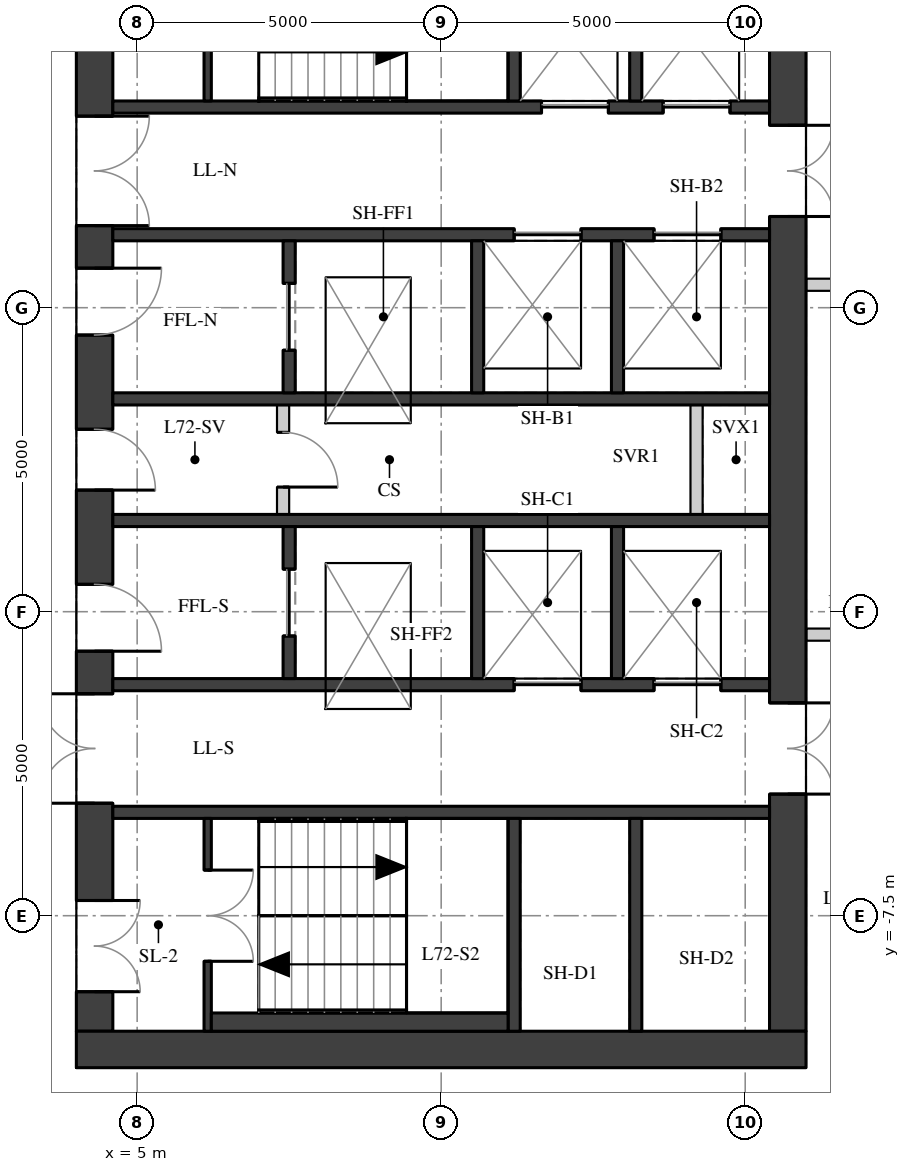
"""IFC4 building model, lengths in metres.
Left out: names, types, materials, properties, quantities, classifications, styles, units other than length and angle.
Written with IfcOpenShell. Run it as: python <this file> out.ifc"""

import sys

from ifc_helpers import new_model, si_unit, direction, frame, frame_2d, origin, place, context, subcontext, project, spatial, rectangle, extrude, element, fill, save


model = new_model("IFC4")
c1 = context("Model", 3, precision=1e-05, world=origin(), true_north=direction((0.0, 1.0)))
c2 = subcontext(c1, "Body", "Model", "MODEL_VIEW")
j1 = project(units=[si_unit("LENGTHUNIT", "METRE"), si_unit("PLANEANGLEUNIT", "RADIAN")], contexts=[c1])
p1 = place(None, origin())
s1 = spatial("IfcSite", under=j1, at=p1, CompositionType="ELEMENT")
p2 = place(p1, origin())
s2 = spatial("IfcBuilding", under=s1, at=p2, CompositionType="ELEMENT")
p3 = place(p2, frame((0.0, 0.0, 253.1)))
s3 = spatial("IfcBuildingStorey", under=s2, at=p3, CompositionType="ELEMENT", Elevation=253.1)
p4 = place(p3, frame((4.3, -9.4, 0.0), z_axis=(0.0, 0.0, 1.0), x_axis=(0.0, 1.0, 0.0)))
e1 = element("IfcWall", 1, at=p4, inside=s3, PredefinedType="SHEAR", context=c2, shape_type="SweptSolid", body=[
    extrude(rectangle(XDim=18.8, YDim=0.6, at=frame_2d((9.4, 0.0))), origin(), (0.0, 0.0, 1.0), 3.02),
])
p5 = place(p4, frame((0.65, 0.0, 0.0)))
e2 = element("IfcOpeningElement", 2, at=p5, cuts=e1, PredefinedType="OPENING", context=c2, shape_type="SweptSolid", body=[
    extrude(rectangle(XDim=1.5, YDim=2.1, at=frame_2d((0.75, 1.05))), frame((0.0, 0.31, 0.0), z_axis=(0.0, -1.0, 0.0), x_axis=(1.0, 0.0, 0.0)), (0.0, 0.0, 1.0), 0.62),
])
p6 = place(p4, frame((3.75, 0.0, 0.0)))
e3 = element("IfcOpeningElement", 3, at=p6, cuts=e1, PredefinedType="OPENING", context=c2, shape_type="SweptSolid", body=[
    extrude(rectangle(XDim=1.8, YDim=2.1, at=frame_2d((0.9, 1.05))), frame((0.0, 0.31, 0.0), z_axis=(0.0, -1.0, 0.0), x_axis=(1.0, 0.0, 0.0)), (0.0, 0.0, 1.0), 0.62),
])
p7 = place(p4, frame((6.25, 0.0, 0.0)))
e4 = element("IfcOpeningElement", 4, at=p7, cuts=e1, PredefinedType="OPENING", context=c2, shape_type="SweptSolid", body=[
    extrude(rectangle(XDim=1.1, YDim=2.1, at=frame_2d((0.55, 1.05))), frame((0.0, 0.31, 0.0), z_axis=(0.0, -1.0, 0.0), x_axis=(1.0, 0.0, 0.0)), (0.0, 0.0, 1.0), 0.62),
])
p8 = place(p4, frame((8.9, 0.0, 0.0)))
e5 = element("IfcOpeningElement", 5, at=p8, cuts=e1, PredefinedType="OPENING", context=c2, shape_type="SweptSolid", body=[
    extrude(rectangle(XDim=1.0, YDim=2.1, at=frame_2d((0.5, 1.05))), frame((0.0, 0.31, 0.0), z_axis=(0.0, -1.0, 0.0), x_axis=(1.0, 0.0, 0.0)), (0.0, 0.0, 1.0), 0.62),
])
p9 = place(p4, frame((11.45, 0.0, 0.0)))
e6 = element("IfcOpeningElement", 6, at=p9, cuts=e1, PredefinedType="OPENING", context=c2, shape_type="SweptSolid", body=[
    extrude(rectangle(XDim=1.1, YDim=2.1, at=frame_2d((0.55, 1.05))), frame((0.0, 0.31, 0.0), z_axis=(0.0, -1.0, 0.0), x_axis=(1.0, 0.0, 0.0)), (0.0, 0.0, 1.0), 0.62),
])
p10 = place(p4, frame((13.25, 0.0, 0.0)))
e7 = element("IfcOpeningElement", 7, at=p10, cuts=e1, PredefinedType="OPENING", context=c2, shape_type="SweptSolid", body=[
    extrude(rectangle(XDim=1.8, YDim=2.1, at=frame_2d((0.9, 1.05))), frame((0.0, 0.31, 0.0), z_axis=(0.0, -1.0, 0.0), x_axis=(1.0, 0.0, 0.0)), (0.0, 0.0, 1.0), 0.62),
])
p11 = place(p4, frame((16.65, 0.0, 0.0)))
e8 = element("IfcOpeningElement", 8, at=p11, cuts=e1, PredefinedType="OPENING", context=c2, shape_type="SweptSolid", body=[
    extrude(rectangle(XDim=1.5, YDim=2.1, at=frame_2d((0.75, 1.05))), frame((0.0, 0.31, 0.0), z_axis=(0.0, -1.0, 0.0), x_axis=(1.0, 0.0, 0.0)), (0.0, 0.0, 1.0), 0.62),
])
p12 = place(p3, frame((15.7, -9.4, 0.0), z_axis=(0.0, 0.0, 1.0), x_axis=(0.0, 1.0, 0.0)))
e9 = element("IfcWall", 9, at=p12, inside=s3, PredefinedType="SHEAR", context=c2, shape_type="SweptSolid", body=[
    extrude(rectangle(XDim=18.8, YDim=0.6, at=frame_2d((9.4, 0.0))), origin(), (0.0, 0.0, 1.0), 3.02),
])
p13 = place(p12, frame((13.4, 0.0, 0.0)))
e10 = element("IfcOpeningElement", 10, at=p13, cuts=e9, PredefinedType="OPENING", context=c2, shape_type="SweptSolid", body=[
    extrude(rectangle(XDim=1.5, YDim=2.1, at=frame_2d((0.75, 1.05))), frame((0.0, 0.31, 0.0), z_axis=(0.0, -1.0, 0.0), x_axis=(1.0, 0.0, 0.0)), (0.0, 0.0, 1.0), 0.62),
])
p14 = place(p12, frame((3.9, 0.0, 0.0)))
e11 = element("IfcOpeningElement", 11, at=p14, cuts=e9, PredefinedType="OPENING", context=c2, shape_type="SweptSolid", body=[
    extrude(rectangle(XDim=1.5, YDim=2.1, at=frame_2d((0.75, 1.05))), frame((0.0, 0.31, 0.0), z_axis=(0.0, -1.0, 0.0), x_axis=(1.0, 0.0, 0.0)), (0.0, 0.0, 1.0), 0.62),
])
p15 = place(p3, frame((4.0, -9.7, 0.0), z_axis=(0.0, 0.0, 1.0), x_axis=(1.0, 0.0, 0.0)))
e12 = element("IfcWall", 12, at=p15, inside=s3, PredefinedType="SHEAR", context=c2, shape_type="SweptSolid", body=[
    extrude(rectangle(XDim=12.0, YDim=0.6, at=frame_2d((6.0, 0.0))), origin(), (0.0, 0.0, 1.0), 3.02),
])
p16 = place(p3, frame((4.6, 5.8, 0.0), z_axis=(0.0, 0.0, 1.0), x_axis=(1.0, 0.0, 0.0)))
e13 = element("IfcWall", 13, at=p16, inside=s3, PredefinedType="SHEAR", context=c2, shape_type="SweptSolid", body=[
    extrude(rectangle(XDim=10.8, YDim=0.2, at=frame_2d((5.4, 0.0))), origin(), (0.0, 0.0, 1.0), 3.02),
])
p17 = place(p16, frame((7.05, 0.0, 0.0)))
e14 = element("IfcOpeningElement", 14, at=p17, cuts=e13, PredefinedType="OPENING", context=c2, shape_type="SweptSolid", body=[
    extrude(rectangle(XDim=1.1, YDim=2.1, at=frame_2d((0.55, 1.05))), frame((0.0, 0.11, 0.0), z_axis=(0.0, -1.0, 0.0), x_axis=(1.0, 0.0, 0.0)), (0.0, 0.0, 1.0), 0.22),
])
p18 = place(p16, frame((9.05, 0.0, 0.0)))
e15 = element("IfcOpeningElement", 15, at=p18, cuts=e13, PredefinedType="OPENING", context=c2, shape_type="SweptSolid", body=[
    extrude(rectangle(XDim=1.1, YDim=2.1, at=frame_2d((0.55, 1.05))), frame((0.0, 0.11, 0.0), z_axis=(0.0, -1.0, 0.0), x_axis=(1.0, 0.0, 0.0)), (0.0, 0.0, 1.0), 0.22),
])
p19 = place(p3, frame((4.6, 3.7, 0.0), z_axis=(0.0, 0.0, 1.0), x_axis=(1.0, 0.0, 0.0)))
e16 = element("IfcWall", 16, at=p19, inside=s3, PredefinedType="SHEAR", context=c2, shape_type="SweptSolid", body=[
    extrude(rectangle(XDim=10.8, YDim=0.2, at=frame_2d((5.4, 0.0))), origin(), (0.0, 0.0, 1.0), 3.02),
])
p20 = place(p19, frame((6.6, 0.0, 0.0)))
e17 = element("IfcOpeningElement", 17, at=p20, cuts=e16, PredefinedType="OPENING", context=c2, shape_type="SweptSolid", body=[
    extrude(rectangle(XDim=1.1, YDim=2.1, at=frame_2d((0.55, 1.05))), frame((0.0, 0.11, 0.0), z_axis=(0.0, -1.0, 0.0), x_axis=(1.0, 0.0, 0.0)), (0.0, 0.0, 1.0), 0.22),
])
p21 = place(p19, frame((8.9, 0.0, 0.0)))
e18 = element("IfcOpeningElement", 18, at=p21, cuts=e16, PredefinedType="OPENING", context=c2, shape_type="SweptSolid", body=[
    extrude(rectangle(XDim=1.1, YDim=2.1, at=frame_2d((0.55, 1.05))), frame((0.0, 0.11, 0.0), z_axis=(0.0, -1.0, 0.0), x_axis=(1.0, 0.0, 0.0)), (0.0, 0.0, 1.0), 0.22),
])
for number, where, z_axis, x_axis in (
    (19, (4.6, 1.0, 0.0), (0.0, 0.0, 1.0), (1.0, 0.0, 0.0)),
    (20, (4.6, -1.0, 0.0), (0.0, 0.0, 1.0), (1.0, 0.0, 0.0)),
):
    element("IfcWall", number, at=place(p3, frame(where, z_axis=z_axis, x_axis=x_axis)), inside=s3, PredefinedType="SHEAR", context=c2, shape_type="SweptSolid", body=[
        extrude(rectangle(XDim=10.8, YDim=0.2, at=frame_2d((5.4, 0.0))), origin(), (0.0, 0.0, 1.0), 3.02),
    ])
p22 = place(p3, frame((4.6, -3.7, 0.0), z_axis=(0.0, 0.0, 1.0), x_axis=(1.0, 0.0, 0.0)))
e21 = element("IfcWall", 21, at=p22, inside=s3, PredefinedType="SHEAR", context=c2, shape_type="SweptSolid", body=[
    extrude(rectangle(XDim=10.8, YDim=0.2, at=frame_2d((5.4, 0.0))), origin(), (0.0, 0.0, 1.0), 3.02),
])
p23 = place(p22, frame((6.6, 0.0, 0.0)))
e22 = element("IfcOpeningElement", 22, at=p23, cuts=e21, PredefinedType="OPENING", context=c2, shape_type="SweptSolid", body=[
    extrude(rectangle(XDim=1.1, YDim=2.1, at=frame_2d((0.55, 1.05))), frame((0.0, 0.11, 0.0), z_axis=(0.0, -1.0, 0.0), x_axis=(1.0, 0.0, 0.0)), (0.0, 0.0, 1.0), 0.22),
])
p24 = place(p22, frame((8.9, 0.0, 0.0)))
e23 = element("IfcOpeningElement", 23, at=p24, cuts=e21, PredefinedType="OPENING", context=c2, shape_type="SweptSolid", body=[
    extrude(rectangle(XDim=1.1, YDim=2.1, at=frame_2d((0.55, 1.05))), frame((0.0, 0.11, 0.0), z_axis=(0.0, -1.0, 0.0), x_axis=(1.0, 0.0, 0.0)), (0.0, 0.0, 1.0), 0.22),
])
p25 = place(p3, frame((4.6, -5.8, 0.0), z_axis=(0.0, 0.0, 1.0), x_axis=(1.0, 0.0, 0.0)))
e24 = element("IfcWall", 24, at=p25, inside=s3, PredefinedType="SHEAR", context=c2, shape_type="SweptSolid", body=[
    extrude(rectangle(XDim=10.8, YDim=0.2, at=frame_2d((5.4, 0.0))), origin(), (0.0, 0.0, 1.0), 3.02),
])
for number, where, z_axis, x_axis in (
    (25, (11.2, 5.9, 0.0), (0.0, 0.0, 1.0), (0.0, 1.0, 0.0)),
    (26, (11.2, -9.4, 0.0), (0.0, 0.0, 1.0), (0.0, 1.0, 0.0)),
    (27, (13.2, 5.9, 0.0), (0.0, 0.0, 1.0), (0.0, 1.0, 0.0)),
    (28, (13.2, -9.4, 0.0), (0.0, 0.0, 1.0), (0.0, 1.0, 0.0)),
):
    element("IfcWall", number, at=place(p3, frame(where, z_axis=z_axis, x_axis=x_axis)), inside=s3, PredefinedType="SHEAR", context=c2, shape_type="SweptSolid", body=[
        extrude(rectangle(XDim=3.5, YDim=0.2, at=frame_2d((1.75, 0.0))), origin(), (0.0, 0.0, 1.0), 3.02),
    ])
p26 = place(p3, frame((7.5, 1.1, 0.0), z_axis=(0.0, 0.0, 1.0), x_axis=(0.0, 1.0, 0.0)))
e29 = element("IfcWall", 29, at=p26, inside=s3, PredefinedType="SHEAR", context=c2, shape_type="SweptSolid", body=[
    extrude(rectangle(XDim=2.5, YDim=0.2, at=frame_2d((1.25, 0.0))), origin(), (0.0, 0.0, 1.0), 3.02),
])
p27 = place(p26, frame((0.7, 0.0, 0.0)))
e30 = element("IfcOpeningElement", 30, at=p27, cuts=e29, PredefinedType="OPENING", context=c2, shape_type="SweptSolid", body=[
    extrude(rectangle(XDim=1.1, YDim=2.1, at=frame_2d((0.55, 1.05))), frame((0.0, 0.11, 0.0), z_axis=(0.0, -1.0, 0.0), x_axis=(1.0, 0.0, 0.0)), (0.0, 0.0, 1.0), 0.22),
])
p28 = place(p3, frame((7.5, -3.6, 0.0), z_axis=(0.0, 0.0, 1.0), x_axis=(0.0, 1.0, 0.0)))
e31 = element("IfcWall", 31, at=p28, inside=s3, PredefinedType="SHEAR", context=c2, shape_type="SweptSolid", body=[
    extrude(rectangle(XDim=2.5, YDim=0.2, at=frame_2d((1.25, 0.0))), origin(), (0.0, 0.0, 1.0), 3.02),
])
p29 = place(p28, frame((0.7, 0.0, 0.0)))
e32 = element("IfcOpeningElement", 32, at=p29, cuts=e31, PredefinedType="OPENING", context=c2, shape_type="SweptSolid", body=[
    extrude(rectangle(XDim=1.1, YDim=2.1, at=frame_2d((0.55, 1.05))), frame((0.0, 0.11, 0.0), z_axis=(0.0, -1.0, 0.0), x_axis=(1.0, 0.0, 0.0)), (0.0, 0.0, 1.0), 0.22),
])
for number, where, z_axis, x_axis in (
    (33, (10.6, 1.1, 0.0), (0.0, 0.0, 1.0), (0.0, 1.0, 0.0)),
    (34, (10.6, -3.6, 0.0), (0.0, 0.0, 1.0), (0.0, 1.0, 0.0)),
    (35, (12.9, 1.1, 0.0), (0.0, 0.0, 1.0), (0.0, 1.0, 0.0)),
    (36, (12.9, -3.6, 0.0), (0.0, 0.0, 1.0), (0.0, 1.0, 0.0)),
):
    element("IfcWall", number, at=place(p3, frame(where, z_axis=z_axis, x_axis=x_axis)), inside=s3, PredefinedType="SHEAR", context=c2, shape_type="SweptSolid", body=[
        extrude(rectangle(XDim=2.5, YDim=0.2, at=frame_2d((1.25, 0.0))), origin(), (0.0, 0.0, 1.0), 3.02),
    ])
p30 = place(p3, frame((6.16, 5.9, 0.0), z_axis=(0.0, 0.0, 1.0), x_axis=(0.0, 1.0, 0.0)))
e37 = element("IfcWall", 37, at=p30, inside=s3, PredefinedType="SHEAR", context=c2, shape_type="SweptSolid", body=[
    extrude(rectangle(XDim=3.5, YDim=0.12, at=frame_2d((1.75, 0.0))), origin(), (0.0, 0.0, 1.0), 3.02),
])
p31 = place(p30, frame((0.85, 0.0, 0.0)))
e38 = element("IfcOpeningElement", 38, at=p31, cuts=e37, PredefinedType="OPENING", context=c2, shape_type="SweptSolid", body=[
    extrude(rectangle(XDim=1.5, YDim=2.1, at=frame_2d((0.75, 1.05))), frame((0.0, 0.07, 0.0), z_axis=(0.0, -1.0, 0.0), x_axis=(1.0, 0.0, 0.0)), (0.0, 0.0, 1.0), 0.14),
])
p32 = place(p3, frame((6.16, -9.4, 0.0), z_axis=(0.0, 0.0, 1.0), x_axis=(0.0, 1.0, 0.0)))
e39 = element("IfcWall", 39, at=p32, inside=s3, PredefinedType="SHEAR", context=c2, shape_type="SweptSolid", body=[
    extrude(rectangle(XDim=3.5, YDim=0.12, at=frame_2d((1.75, 0.0))), origin(), (0.0, 0.0, 1.0), 3.02),
])
p33 = place(p32, frame((1.15, 0.0, 0.0)))
e40 = element("IfcOpeningElement", 40, at=p33, cuts=e39, PredefinedType="OPENING", context=c2, shape_type="SweptSolid", body=[
    extrude(rectangle(XDim=1.5, YDim=2.1, at=frame_2d((0.75, 1.05))), frame((0.0, 0.07, 0.0), z_axis=(0.0, -1.0, 0.0), x_axis=(1.0, 0.0, 0.0)), (0.0, 0.0, 1.0), 0.14),
])
p34 = place(p3, frame((7.4, -0.9, 0.0), z_axis=(0.0, 0.0, 1.0), x_axis=(0.0, 1.0, 0.0)))
e41 = element("IfcWall", 41, at=p34, inside=s3, PredefinedType="PARTITIONING", context=c2, shape_type="SweptSolid", body=[
    extrude(rectangle(XDim=1.8, YDim=0.2, at=frame_2d((0.9, 0.0))), origin(), (0.0, 0.0, 1.0), 3.02),
])
p35 = place(p34, frame((0.45, 0.0, 0.0)))
e42 = element("IfcOpeningElement", 42, at=p35, cuts=e41, PredefinedType="OPENING", context=c2, shape_type="SweptSolid", body=[
    extrude(rectangle(XDim=0.9, YDim=2.1, at=frame_2d((0.45, 1.05))), frame((0.0, 0.11, 0.0), z_axis=(0.0, -1.0, 0.0), x_axis=(1.0, 0.0, 0.0)), (0.0, 0.0, 1.0), 0.22),
])
p36 = place(p3, frame((14.2, -0.9, 0.0), z_axis=(0.0, 0.0, 1.0), x_axis=(0.0, 1.0, 0.0)))
e43 = element("IfcWall", 43, at=p36, inside=s3, PredefinedType="PARTITIONING", context=c2, shape_type="SweptSolid", body=[
    extrude(rectangle(XDim=1.8, YDim=0.2, at=frame_2d((0.9, 0.0))), origin(), (0.0, 0.0, 1.0), 3.02),
])
p37 = place(p3, frame((6.22, -9.25, 0.0), z_axis=(0.0, 0.0, 1.0), x_axis=(1.0, 0.0, 0.0)))
e44 = element("IfcWall", 44, at=p37, inside=s3, PredefinedType="PARTITIONING", context=c2, shape_type="SweptSolid", body=[
    extrude(rectangle(XDim=4.88, YDim=0.3, at=frame_2d((2.44, 0.0))), origin(), (0.0, 0.0, 1.0), 3.02),
])
p38 = place(p3, frame((17.5, 2.877, 0.0), z_axis=(0.0, 0.0, 1.0), x_axis=(-1.0, 0.0, 0.0)))
e45 = element("IfcWall", 45, at=p38, inside=s3, PredefinedType="PARTITIONING", context=c2, shape_type="SweptSolid", body=[
    extrude(rectangle(XDim=1.496, YDim=0.2, at=frame_2d((0.748, 0.0))), origin(), (0.0, 0.0, 1.0), 3.02),
])
p39 = place(p3, frame((16.004, -2.877, 0.0), z_axis=(0.0, 0.0, 1.0), x_axis=(1.0, 0.0, 0.0)))
e46 = element("IfcWall", 46, at=p39, inside=s3, PredefinedType="PARTITIONING", context=c2, shape_type="SweptSolid", body=[
    extrude(rectangle(XDim=1.596, YDim=0.2, at=frame_2d((0.798, 0.0))), origin(), (0.0, 0.0, 1.0), 2.57),
])
p40 = place(p5, origin())
e47 = element("IfcDoor", 47, at=p40, inside=s3, OperationType="DOUBLE_DOOR_SINGLE_SWING", PredefinedType="DOOR", context=c2, shape_type="SweptSolid", body=[
    extrude(rectangle(XDim=1.5, YDim=2.1, at=frame_2d((0.75, 1.05))), frame((0.0, 0.025, 0.0), z_axis=(0.0, -1.0, 0.0), x_axis=(1.0, 0.0, 0.0)), (0.0, 0.0, 1.0), 0.05),
])
fill(e2, e47)
p41 = place(p6, origin())
e48 = element("IfcDoor", 48, at=p41, inside=s3, OperationType="DOUBLE_DOOR_SINGLE_SWING", PredefinedType="DOOR", context=c2, shape_type="SweptSolid", body=[
    extrude(rectangle(XDim=1.8, YDim=2.1, at=frame_2d((0.9, 1.05))), frame((0.0, 0.025, 0.0), z_axis=(0.0, -1.0, 0.0), x_axis=(1.0, 0.0, 0.0)), (0.0, 0.0, 1.0), 0.05),
])
fill(e3, e48)
p42 = place(p7, origin())
e49 = element("IfcDoor", 49, at=p42, inside=s3, OperationType="SINGLE_SWING_RIGHT", PredefinedType="DOOR", context=c2, shape_type="SweptSolid", body=[
    extrude(rectangle(XDim=1.1, YDim=2.1, at=frame_2d((0.55, 1.05))), frame((0.0, 0.025, 0.0), z_axis=(0.0, -1.0, 0.0), x_axis=(1.0, 0.0, 0.0)), (0.0, 0.0, 1.0), 0.05),
])
fill(e4, e49)
p43 = place(p8, origin())
e50 = element("IfcDoor", 50, at=p43, inside=s3, OperationType="SINGLE_SWING_RIGHT", PredefinedType="DOOR", context=c2, shape_type="SweptSolid", body=[
    extrude(rectangle(XDim=1.0, YDim=2.1, at=frame_2d((0.5, 1.05))), frame((0.0, 0.025, 0.0), z_axis=(0.0, -1.0, 0.0), x_axis=(1.0, 0.0, 0.0)), (0.0, 0.0, 1.0), 0.05),
])
fill(e5, e50)
p44 = place(p9, origin())
e51 = element("IfcDoor", 51, at=p44, inside=s3, OperationType="SINGLE_SWING_LEFT", PredefinedType="DOOR", context=c2, shape_type="SweptSolid", body=[
    extrude(rectangle(XDim=1.1, YDim=2.1, at=frame_2d((0.55, 1.05))), frame((0.0, 0.025, 0.0), z_axis=(0.0, -1.0, 0.0), x_axis=(1.0, 0.0, 0.0)), (0.0, 0.0, 1.0), 0.05),
])
fill(e6, e51)
p45 = place(p10, origin())
e52 = element("IfcDoor", 52, at=p45, inside=s3, OperationType="DOUBLE_DOOR_SINGLE_SWING", PredefinedType="DOOR", context=c2, shape_type="SweptSolid", body=[
    extrude(rectangle(XDim=1.8, YDim=2.1, at=frame_2d((0.9, 1.05))), frame((0.0, 0.025, 0.0), z_axis=(0.0, -1.0, 0.0), x_axis=(1.0, 0.0, 0.0)), (0.0, 0.0, 1.0), 0.05),
])
fill(e7, e52)
p46 = place(p13, origin())
e53 = element("IfcDoor", 53, at=p46, inside=s3, OperationType="DOUBLE_DOOR_SINGLE_SWING", PredefinedType="DOOR", context=c2, shape_type="SweptSolid", body=[
    extrude(rectangle(XDim=1.5, YDim=2.1, at=frame_2d((0.75, 1.05))), frame((0.0, 0.025, 0.0), z_axis=(0.0, -1.0, 0.0), x_axis=(1.0, 0.0, 0.0)), (0.0, 0.0, 1.0), 0.05),
])
fill(e10, e53)
p47 = place(p14, origin())
e54 = element("IfcDoor", 54, at=p47, inside=s3, OperationType="DOUBLE_DOOR_SINGLE_SWING", PredefinedType="DOOR", context=c2, shape_type="SweptSolid", body=[
    extrude(rectangle(XDim=1.5, YDim=2.1, at=frame_2d((0.75, 1.05))), frame((0.0, 0.025, 0.0), z_axis=(0.0, -1.0, 0.0), x_axis=(1.0, 0.0, 0.0)), (0.0, 0.0, 1.0), 0.05),
])
fill(e11, e54)
p48 = place(p33, origin())
e55 = element("IfcDoor", 55, at=p48, inside=s3, OperationType="DOUBLE_DOOR_SINGLE_SWING", PredefinedType="DOOR", context=c2, shape_type="SweptSolid", body=[
    extrude(rectangle(XDim=1.5, YDim=2.1, at=frame_2d((0.75, 1.05))), frame((0.0, 0.025, 0.0), z_axis=(0.0, -1.0, 0.0), x_axis=(1.0, 0.0, 0.0)), (0.0, 0.0, 1.0), 0.05),
])
fill(e40, e55)
p49 = place(p17, origin())
e56 = element("IfcDoor", 56, at=p49, inside=s3, OperationType="DOUBLE_DOOR_SLIDING", PredefinedType="DOOR", context=c2, shape_type="SweptSolid", body=[
    extrude(rectangle(XDim=1.1, YDim=2.1, at=frame_2d((0.55, 1.05))), frame((0.0, 0.025, 0.0), z_axis=(0.0, -1.0, 0.0), x_axis=(1.0, 0.0, 0.0)), (0.0, 0.0, 1.0), 0.05),
])
fill(e14, e56)
p50 = place(p18, origin())
e57 = element("IfcDoor", 57, at=p50, inside=s3, OperationType="DOUBLE_DOOR_SLIDING", PredefinedType="DOOR", context=c2, shape_type="SweptSolid", body=[
    extrude(rectangle(XDim=1.1, YDim=2.1, at=frame_2d((0.55, 1.05))), frame((0.0, 0.025, 0.0), z_axis=(0.0, -1.0, 0.0), x_axis=(1.0, 0.0, 0.0)), (0.0, 0.0, 1.0), 0.05),
])
fill(e15, e57)
p51 = place(p20, origin())
e58 = element("IfcDoor", 58, at=p51, inside=s3, OperationType="DOUBLE_DOOR_SLIDING", PredefinedType="DOOR", context=c2, shape_type="SweptSolid", body=[
    extrude(rectangle(XDim=1.1, YDim=2.1, at=frame_2d((0.55, 1.05))), frame((0.0, 0.025, 0.0), z_axis=(0.0, -1.0, 0.0), x_axis=(1.0, 0.0, 0.0)), (0.0, 0.0, 1.0), 0.05),
])
fill(e17, e58)
p52 = place(p21, origin())
e59 = element("IfcDoor", 59, at=p52, inside=s3, OperationType="DOUBLE_DOOR_SLIDING", PredefinedType="DOOR", context=c2, shape_type="SweptSolid", body=[
    extrude(rectangle(XDim=1.1, YDim=2.1, at=frame_2d((0.55, 1.05))), frame((0.0, 0.025, 0.0), z_axis=(0.0, -1.0, 0.0), x_axis=(1.0, 0.0, 0.0)), (0.0, 0.0, 1.0), 0.05),
])
fill(e18, e59)
p53 = place(p23, origin())
e60 = element("IfcDoor", 60, at=p53, inside=s3, OperationType="DOUBLE_DOOR_SLIDING", PredefinedType="DOOR", context=c2, shape_type="SweptSolid", body=[
    extrude(rectangle(XDim=1.1, YDim=2.1, at=frame_2d((0.55, 1.05))), frame((0.0, 0.025, 0.0), z_axis=(0.0, -1.0, 0.0), x_axis=(1.0, 0.0, 0.0)), (0.0, 0.0, 1.0), 0.05),
])
fill(e22, e60)
p54 = place(p24, origin())
e61 = element("IfcDoor", 61, at=p54, inside=s3, OperationType="DOUBLE_DOOR_SLIDING", PredefinedType="DOOR", context=c2, shape_type="SweptSolid", body=[
    extrude(rectangle(XDim=1.1, YDim=2.1, at=frame_2d((0.55, 1.05))), frame((0.0, 0.025, 0.0), z_axis=(0.0, -1.0, 0.0), x_axis=(1.0, 0.0, 0.0)), (0.0, 0.0, 1.0), 0.05),
])
fill(e23, e61)
p55 = place(p27, origin())
e62 = element("IfcDoor", 62, at=p55, inside=s3, OperationType="DOUBLE_DOOR_SLIDING", PredefinedType="DOOR", context=c2, shape_type="SweptSolid", body=[
    extrude(rectangle(XDim=1.1, YDim=2.1, at=frame_2d((0.55, 1.05))), frame((0.0, 0.025, 0.0), z_axis=(0.0, -1.0, 0.0), x_axis=(1.0, 0.0, 0.0)), (0.0, 0.0, 1.0), 0.05),
])
fill(e30, e62)
p56 = place(p29, origin())
e63 = element("IfcDoor", 63, at=p56, inside=s3, OperationType="DOUBLE_DOOR_SLIDING", PredefinedType="DOOR", context=c2, shape_type="SweptSolid", body=[
    extrude(rectangle(XDim=1.1, YDim=2.1, at=frame_2d((0.55, 1.05))), frame((0.0, 0.025, 0.0), z_axis=(0.0, -1.0, 0.0), x_axis=(1.0, 0.0, 0.0)), (0.0, 0.0, 1.0), 0.05),
])
fill(e32, e63)
p57 = place(p35, origin())
e64 = element("IfcDoor", 64, at=p57, inside=s3, OperationType="SINGLE_SWING_RIGHT", PredefinedType="DOOR", context=c2, shape_type="SweptSolid", body=[
    extrude(rectangle(XDim=0.9, YDim=2.1, at=frame_2d((0.45, 1.05))), frame((0.0, 0.025, 0.0), z_axis=(0.0, -1.0, 0.0), x_axis=(1.0, 0.0, 0.0)), (0.0, 0.0, 1.0), 0.05),
])
fill(e42, e64)
save(model, sys.argv[1])
